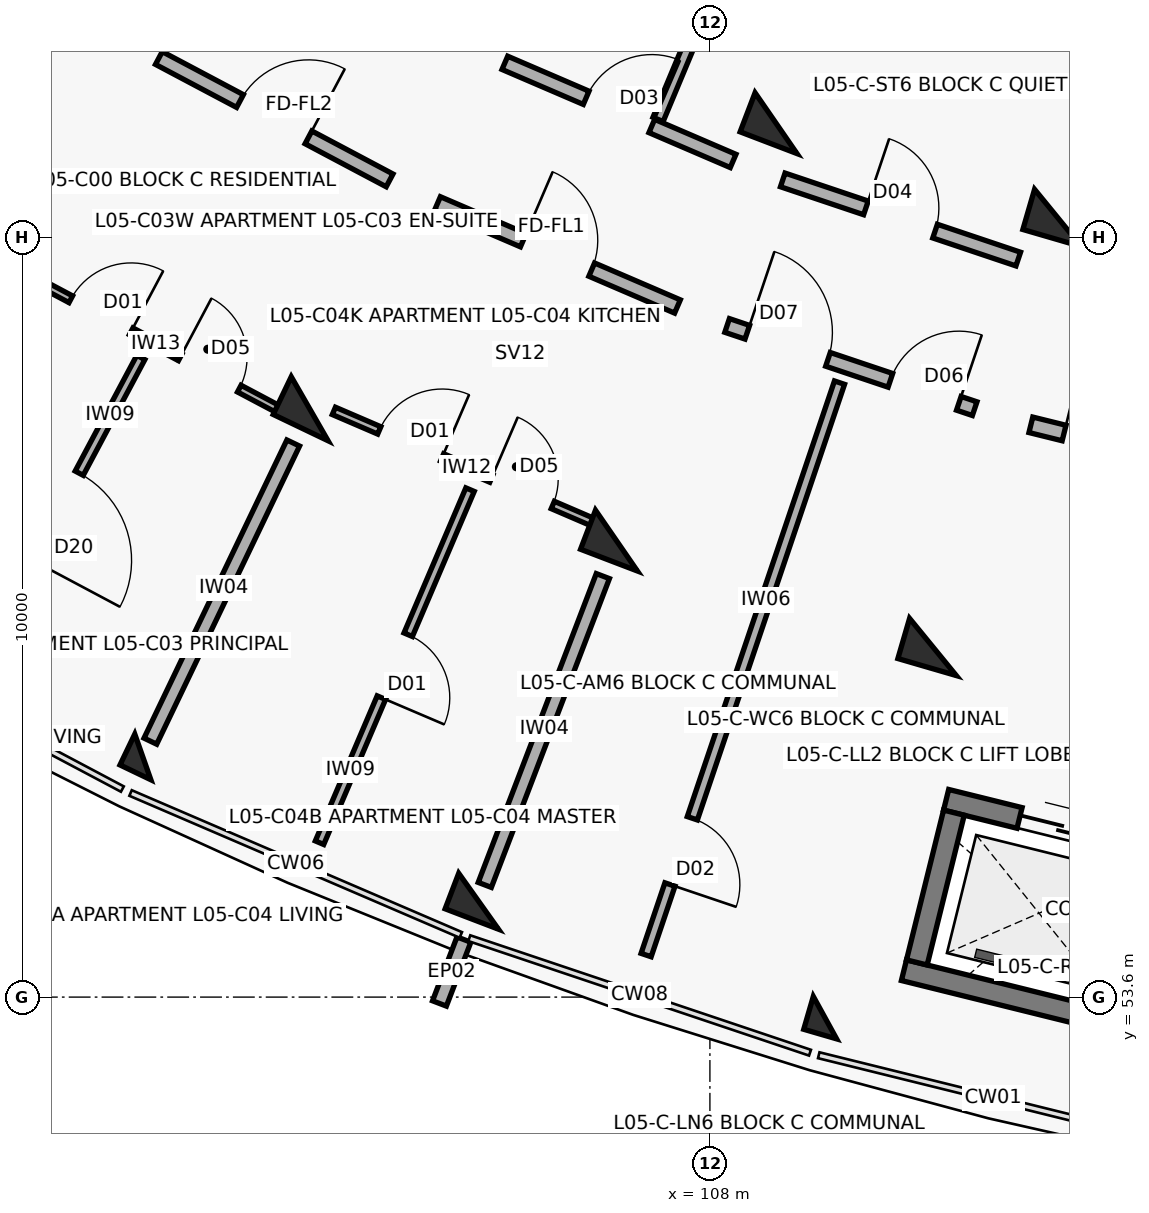
"""IFC4 building model, lengths in metres.
Left out: names, types, materials, properties, quantities, classifications, styles, units other than length and angle.
Written with IfcOpenShell. Run it as: python <this file> out.ifc"""

import sys

from ifc_helpers import new_model, si_unit, direction, frame, frame_2d, origin, origin_2d, place, context, subcontext, project, spatial, rectangle, extrude, element, fill, save


model = new_model("IFC4")
c1 = context("Model", 3, precision=1e-05, world=origin(), true_north=direction((0.0, 1.0)))
c2 = subcontext(c1, "Body", "Model", "MODEL_VIEW")
j1 = project(units=[si_unit("LENGTHUNIT", "METRE"), si_unit("PLANEANGLEUNIT", "RADIAN")], contexts=[c1])
p1 = place(None, origin())
s1 = spatial("IfcSite", under=j1, at=p1, CompositionType="ELEMENT")
p2 = place(p1, origin())
s2 = spatial("IfcBuilding", under=s1, at=p2, CompositionType="ELEMENT")
p3 = place(p2, frame((0.0, 0.0, 17.4)))
s3 = spatial("IfcBuildingStorey", under=s2, at=p3, CompositionType="ELEMENT", Elevation=17.4)
p4 = place(p3, frame((102.734, 61.341, 0.0), z_axis=(0.0, 0.0, 1.0), x_axis=(-0.432085748802, -0.901832526405, 0.0)))
e1 = element("IfcColumn", 1, at=p4, inside=s3, PredefinedType="COLUMN", context=c2, shape_type="SweptSolid", body=[
    extrude(rectangle(XDim=0.55, YDim=0.8, at=origin_2d()), origin(), (0.0, 0.0, 1.0), 3.1),
])
p5 = place(p3, frame((100.539, 56.76, 0.0), z_axis=(0.0, 0.0, 1.0), x_axis=(-0.432085748802, -0.901832526405, 0.0)))
e2 = element("IfcColumn", 2, at=p5, inside=s3, PredefinedType="COLUMN", context=c2, shape_type="SweptSolid", body=[
    extrude(rectangle(XDim=0.45, YDim=0.45, at=origin_2d()), origin(), (0.0, 0.0, 1.0), 3.1),
])
for number, where, z_axis, x_axis in (
    (3, (108.869, 65.099, 0.0), (0.0, 0.0, 1.0), (-0.357, -0.934, 0.0)),
    (4, (106.77, 59.606, 0.0), (0.0, 0.0, 1.0), (-0.357, -0.934, 0.0)),
):
    element("IfcColumn", number, at=place(p3, frame(where, z_axis=z_axis, x_axis=x_axis)), inside=s3, PredefinedType="COLUMN", context=c2, shape_type="SweptSolid", body=[
        extrude(rectangle(XDim=0.55, YDim=0.8, at=origin_2d()), origin(), (0.0, 0.0, 1.0), 3.1),
    ])
p6 = place(p3, frame((104.956, 54.861, 0.0), z_axis=(0.0, 0.0, 1.0), x_axis=(-0.357064076459, -0.934079892355, 0.0)))
e5 = element("IfcColumn", 5, at=p6, inside=s3, PredefinedType="COLUMN", context=c2, shape_type="SweptSolid", body=[
    extrude(rectangle(XDim=0.5, YDim=0.75, at=origin_2d()), origin(), (0.0, 0.0, 1.0), 3.1),
])
for number, where, z_axis, x_axis in (
    (6, (112.579, 63.852, 0.0), (0.0, 0.0, 1.0), (-0.28, -0.96, 0.0)),
    (7, (110.934, 58.207, 0.0), (0.0, 0.0, 1.0), (-0.28, -0.96, 0.0)),
):
    element("IfcColumn", number, at=place(p3, frame(where, z_axis=z_axis, x_axis=x_axis)), inside=s3, PredefinedType="COLUMN", context=c2, shape_type="SweptSolid", body=[
        extrude(rectangle(XDim=0.55, YDim=0.8, at=origin_2d()), origin(), (0.0, 0.0, 1.0), 3.1),
    ])
p7 = place(p3, frame((109.513, 53.329, 0.0), z_axis=(0.0, 0.0, 1.0), x_axis=(-0.27966144946, -0.96009867914, 0.0)))
e8 = element("IfcColumn", 8, at=p7, inside=s3, PredefinedType="COLUMN", context=c2, shape_type="SweptSolid", body=[
    extrude(rectangle(XDim=0.45, YDim=0.45, at=origin_2d()), origin(), (0.0, 0.0, 1.0), 3.1),
])
p8 = place(p3, frame((104.763, 54.357, 0.0), z_axis=(0.0, 0.0, 1.0), x_axis=(-0.357033038474, -0.934091756434, 0.0)))
e9 = element("IfcWall", 9, at=p8, inside=s3, PredefinedType="PARAPET", context=c2, shape_type="SweptSolid", body=[
    extrude(rectangle(XDim=0.9, YDim=0.195, at=frame_2d((0.45, 0.0))), origin(), (0.0, 0.0, 1.0), 2.25),
])
p9 = place(p3, frame((111.108, 56.196, 0.0), z_axis=(0.0, 0.0, 1.0), x_axis=(0.970706856107, -0.240266933861, 0.0)))
e10 = element("IfcWall", 10, at=p9, inside=s3, PredefinedType="SHEAR", context=c2, shape_type="SweptSolid", body=[
    extrude(rectangle(XDim=3.09, YDim=0.28, at=frame_2d((1.545, 0.0))), origin(), (0.0, 0.0, 1.0), 3.1),
])
p10 = place(p9, frame((0.995, 0.0, 0.0)))
e11 = element("IfcOpeningElement", 11, at=p10, cuts=e10, PredefinedType="OPENING", context=c2, shape_type="SweptSolid", body=[
    extrude(rectangle(XDim=1.1, YDim=2.15, at=frame_2d((0.55, 1.075))), frame((0.0, 0.15, 0.0), z_axis=(0.0, -1.0, 0.0), x_axis=(1.0, 0.0, 0.0)), (0.0, 0.0, 1.0), 0.3),
])
p11 = place(p3, frame((110.553, 53.954, 0.0), z_axis=(0.0, 0.0, 1.0), x_axis=(0.970725280816, -0.240192483614, 0.0)))
e12 = element("IfcWall", 12, at=p11, inside=s3, PredefinedType="SHEAR", context=c2, shape_type="SweptSolid", body=[
    extrude(rectangle(XDim=3.09, YDim=0.28, at=frame_2d((1.545, 0.0))), origin(), (0.0, 0.0, 1.0), 3.1),
])
p12 = place(p3, frame((111.21, 56.027, 0.0), z_axis=(0.0, 0.0, 1.0), x_axis=(-0.240186044774, -0.970726873995, 0.0)))
e13 = element("IfcWall", 13, at=p12, inside=s3, PredefinedType="SHEAR", context=c2, shape_type="SweptSolid", body=[
    extrude(rectangle(XDim=2.03, YDim=0.28, at=frame_2d((1.015, 0.0))), origin(), (0.0, 0.0, 1.0), 3.1),
])
p13 = place(p3, frame((100.75, 65.956, 0.0), z_axis=(0.0, 0.0, 1.0), x_axis=(0.883440266101, -0.468543803963, 0.0)))
e14 = element("IfcWall", 14, at=p13, inside=s3, PredefinedType="SOLIDWALL", context=c2, shape_type="SweptSolid", body=[
    extrude(rectangle(XDim=3.436, YDim=0.19, at=frame_2d((1.718, 0.0))), origin(), (0.0, 0.0, 1.0), 2.08),
])
p14 = place(p13, frame((1.208, 0.0, 0.0)))
e15 = element("IfcOpeningElement", 15, at=p14, cuts=e14, PredefinedType="OPENING", context=c2, shape_type="SweptSolid", body=[
    extrude(rectangle(XDim=1.02, YDim=2.15, at=frame_2d((0.51, 1.075))), frame((0.0, 0.105, 0.0), z_axis=(0.0, -1.0, 0.0), x_axis=(1.0, 0.0, 0.0)), (0.0, 0.0, 1.0), 0.21),
])
p15 = place(p3, frame((99.017, 63.087, 0.0), z_axis=(0.0, 0.0, 1.0), x_axis=(0.883415075746, -0.468591297342, 0.0)))
e16 = element("IfcWall", 16, at=p15, inside=s3, PredefinedType="PARTITIONING", context=c2, shape_type="SweptSolid", body=[
    extrude(rectangle(XDim=3.81, YDim=0.1, at=frame_2d((1.905, 0.0))), origin(), (0.0, 0.0, 1.0), 2.08),
])
p16 = place(p15, frame((0.65, 0.0, 0.0)))
e17 = element("IfcOpeningElement", 17, at=p16, cuts=e16, PredefinedType="OPENING", context=c2, shape_type="SweptSolid", body=[
    extrude(rectangle(XDim=0.9, YDim=2.1, at=frame_2d((0.45, 1.05))), frame((0.0, 0.06, 0.0), z_axis=(0.0, -1.0, 0.0), x_axis=(1.0, 0.0, 0.0)), (0.0, 0.0, 1.0), 0.12),
])
p17 = place(p15, frame((2.28, 0.0, 0.0)))
e18 = element("IfcOpeningElement", 18, at=p17, cuts=e16, PredefinedType="OPENING", context=c2, shape_type="SweptSolid", body=[
    extrude(rectangle(XDim=0.88, YDim=2.1, at=frame_2d((0.44, 1.05))), frame((0.0, 0.06, 0.0), z_axis=(0.0, -1.0, 0.0), x_axis=(1.0, 0.0, 0.0)), (0.0, 0.0, 1.0), 0.12),
])
p18 = place(p3, frame((100.513, 62.016, 0.0), z_axis=(0.0, 0.0, 1.0), x_axis=(-0.469889133168, -0.882725440061, 0.0)))
e19 = element("IfcWall", 19, at=p18, inside=s3, PredefinedType="PARTITIONING", context=c2, shape_type="SweptSolid", body=[
    extrude(rectangle(XDim=4.75, YDim=0.12, at=frame_2d((2.375, 0.0))), origin(), (0.0, 0.0, 1.0), 2.08),
])
p19 = place(p18, frame((1.725, 0.0, 0.0)))
e20 = element("IfcOpeningElement", 20, at=p19, cuts=e19, PredefinedType="OPENING", context=c2, shape_type="SweptSolid", body=[
    extrude(rectangle(XDim=1.3, YDim=2.1, at=frame_2d((0.65, 1.05))), frame((0.0, 0.07, 0.0), z_axis=(0.0, -1.0, 0.0), x_axis=(1.0, 0.0, 0.0)), (0.0, 0.0, 1.0), 0.14),
])
p20 = place(p3, frame((104.417, 64.044, 0.0), z_axis=(0.0, 0.0, 1.0), x_axis=(0.918718172399, -0.394913813008, 0.0)))
e21 = element("IfcWall", 21, at=p20, inside=s3, PredefinedType="SOLIDWALL", context=c2, shape_type="SweptSolid", body=[
    extrude(rectangle(XDim=3.436, YDim=0.19, at=frame_2d((1.718, 0.0))), origin(), (0.0, 0.0, 1.0), 2.08),
])
p21 = place(p20, frame((1.228, 0.0, 0.0)))
e22 = element("IfcOpeningElement", 22, at=p21, cuts=e21, PredefinedType="OPENING", context=c2, shape_type="SweptSolid", body=[
    extrude(rectangle(XDim=0.98, YDim=2.15, at=frame_2d((0.49, 1.075))), frame((0.0, 0.105, 0.0), z_axis=(0.0, -1.0, 0.0), x_axis=(1.0, 0.0, 0.0)), (0.0, 0.0, 1.0), 0.21),
])
p22 = place(p3, frame((105.302, 65.893, 0.0), z_axis=(0.0, 0.0, 1.0), x_axis=(0.918723391052, -0.394901672235, 0.0)))
e23 = element("IfcWall", 23, at=p22, inside=s3, PredefinedType="SOLIDWALL", context=c2, shape_type="SweptSolid", body=[
    extrude(rectangle(XDim=3.269, YDim=0.19, at=frame_2d((1.634, 0.0))), origin(), (0.0, 0.0, 1.0), 2.08),
])
p23 = place(p22, frame((1.164, 0.0, 0.0)))
e24 = element("IfcOpeningElement", 24, at=p23, cuts=e23, PredefinedType="OPENING", context=c2, shape_type="SweptSolid", body=[
    extrude(rectangle(XDim=0.94, YDim=2.1, at=frame_2d((0.47, 1.05))), frame((0.0, 0.105, 0.0), z_axis=(0.0, -1.0, 0.0), x_axis=(1.0, 0.0, 0.0)), (0.0, 0.0, 1.0), 0.21),
])
p24 = place(p3, frame((108.589, 68.194, 0.0), z_axis=(0.0, 0.0, 1.0), x_axis=(-0.385151143297, -0.922853507777, 0.0)))
e25 = element("IfcWall", 25, at=p24, inside=s3, PredefinedType="PARTITIONING", context=c2, shape_type="SweptSolid", body=[
    extrude(rectangle(XDim=3.3, YDim=0.145, at=frame_2d((1.65, 0.0))), origin(), (0.0, 0.0, 1.0), 2.08),
])
p25 = place(p24, frame((1.21, 0.0, 0.0)))
e26 = element("IfcOpeningElement", 26, at=p25, cuts=e25, PredefinedType="OPENING", context=c2, shape_type="SweptSolid", body=[
    extrude(rectangle(XDim=0.88, YDim=2.1, at=frame_2d((0.44, 1.05))), frame((0.0, 0.083, 0.0), z_axis=(0.0, -1.0, 0.0), x_axis=(1.0, 0.0, 0.0)), (0.0, 0.0, 1.0), 0.165),
])
p26 = place(p3, frame((103.052, 61.313, 0.0), z_axis=(0.0, 0.0, 1.0), x_axis=(0.918714121981, -0.39492323567, 0.0)))
e27 = element("IfcWall", 27, at=p26, inside=s3, PredefinedType="PARTITIONING", context=c2, shape_type="SweptSolid", body=[
    extrude(rectangle(XDim=3.785, YDim=0.105, at=frame_2d((1.893, 0.0))), origin(), (0.0, 0.0, 1.0), 2.08),
])
p27 = place(p26, frame((0.65, 0.0, 0.0)))
e28 = element("IfcOpeningElement", 28, at=p27, cuts=e27, PredefinedType="OPENING", context=c2, shape_type="SweptSolid", body=[
    extrude(rectangle(XDim=0.9, YDim=2.1, at=frame_2d((0.45, 1.05))), frame((0.0, 0.062, 0.0), z_axis=(0.0, -1.0, 0.0), x_axis=(1.0, 0.0, 0.0)), (0.0, 0.0, 1.0), 0.125),
])
p28 = place(p26, frame((2.255, 0.0, 0.0)))
e29 = element("IfcOpeningElement", 29, at=p28, cuts=e27, PredefinedType="OPENING", context=c2, shape_type="SweptSolid", body=[
    extrude(rectangle(XDim=0.88, YDim=2.1, at=frame_2d((0.44, 1.05))), frame((0.0, 0.062, 0.0), z_axis=(0.0, -1.0, 0.0), x_axis=(1.0, 0.0, 0.0)), (0.0, 0.0, 1.0), 0.125),
])
p29 = place(p3, frame((104.844, 60.277, 0.0), z_axis=(0.0, 0.0, 1.0), x_axis=(-0.392127280422, -0.919910971751, 0.0)))
e30 = element("IfcWall", 30, at=p29, inside=s3, PredefinedType="PARTITIONING", context=c2, shape_type="SweptSolid", body=[
    extrude(rectangle(XDim=5.05, YDim=0.12, at=frame_2d((2.525, 0.0))), origin(), (0.0, 0.0, 1.0), 2.08),
])
p30 = place(p29, frame((2.075, 0.0, 0.0)))
e31 = element("IfcOpeningElement", 31, at=p30, cuts=e30, PredefinedType="OPENING", context=c2, shape_type="SweptSolid", body=[
    extrude(rectangle(XDim=0.9, YDim=2.1, at=frame_2d((0.45, 1.05))), frame((0.0, 0.07, 0.0), z_axis=(0.0, -1.0, 0.0), x_axis=(1.0, 0.0, 0.0)), (0.0, 0.0, 1.0), 0.14),
])
p31 = place(p3, frame((102.518, 60.89, 0.0), z_axis=(0.0, 0.0, 1.0), x_axis=(-0.432108769108, -0.901821496561, 0.0)))
e32 = element("IfcWall", 32, at=p31, inside=s3, PredefinedType="SOLIDWALL", context=c2, shape_type="SweptSolid", body=[
    extrude(rectangle(XDim=4.35, YDim=0.185, at=frame_2d((2.175, 0.0))), origin(), (0.0, 0.0, 1.0), 2.08),
])
p32 = place(p3, frame((108.227, 62.437, 0.0), z_axis=(0.0, 0.0, 1.0), x_axis=(0.947884468821, -0.318614239745, 0.0)))
e33 = element("IfcWall", 33, at=p32, inside=s3, PredefinedType="SOLIDWALL", context=c2, shape_type="SweptSolid", body=[
    extrude(rectangle(XDim=3.436, YDim=0.19, at=frame_2d((1.718, 0.0))), origin(), (0.0, 0.0, 1.0), 2.08),
])
p33 = place(p32, frame((0.28, 0.0, 0.0)))
e34 = element("IfcOpeningElement", 34, at=p33, cuts=e33, PredefinedType="OPENING", context=c2, shape_type="SweptSolid", body=[
    extrude(rectangle(XDim=1.12, YDim=2.15, at=frame_2d((0.56, 1.075))), frame((0.0, 0.105, 0.0), z_axis=(0.0, -1.0, 0.0), x_axis=(1.0, 0.0, 0.0)), (0.0, 0.0, 1.0), 0.21),
])
p34 = place(p32, frame((2.266, 0.0, 0.0)))
e35 = element("IfcOpeningElement", 35, at=p34, cuts=e33, PredefinedType="OPENING", context=c2, shape_type="SweptSolid", body=[
    extrude(rectangle(XDim=0.95, YDim=2.1, at=frame_2d((0.475, 1.05))), frame((0.0, 0.105, 0.0), z_axis=(0.0, -1.0, 0.0), x_axis=(1.0, 0.0, 0.0)), (0.0, 0.0, 1.0), 0.21),
])
p35 = place(p3, frame((108.958, 64.352, 0.0), z_axis=(0.0, 0.0, 1.0), x_axis=(0.94787351033, -0.318646839643, 0.0)))
e36 = element("IfcWall", 36, at=p35, inside=s3, PredefinedType="SOLIDWALL", context=c2, shape_type="SweptSolid", body=[
    extrude(rectangle(XDim=3.269, YDim=0.19, at=frame_2d((1.634, 0.0))), origin(), (0.0, 0.0, 1.0), 2.08),
])
p36 = place(p35, frame((1.154, 0.0, 0.0)))
e37 = element("IfcOpeningElement", 37, at=p36, cuts=e36, PredefinedType="OPENING", context=c2, shape_type="SweptSolid", body=[
    extrude(rectangle(XDim=0.96, YDim=2.1, at=frame_2d((0.48, 1.05))), frame((0.0, 0.105, 0.0), z_axis=(0.0, -1.0, 0.0), x_axis=(1.0, 0.0, 0.0)), (0.0, 0.0, 1.0), 0.21),
])
p37 = place(p3, frame((109.705, 61.685, 0.0), z_axis=(0.0, 0.0, 1.0), x_axis=(-0.320057771325, -0.947398027766, 0.0)))
e38 = element("IfcWall", 38, at=p37, inside=s3, PredefinedType="PARTITIONING", context=c2, shape_type="SweptSolid", body=[
    extrude(rectangle(XDim=7.95, YDim=0.14, at=frame_2d((3.975, 0.0))), origin(), (0.0, 0.0, 1.0), 2.08),
])
p38 = place(p37, frame((6.05, 0.0, 0.0)))
e39 = element("IfcOpeningElement", 39, at=p38, cuts=e38, PredefinedType="OPENING", context=c2, shape_type="SweptSolid", body=[
    extrude(rectangle(XDim=0.92, YDim=2.1, at=frame_2d((0.46, 1.05))), frame((0.0, 0.08, 0.0), z_axis=(0.0, -1.0, 0.0), x_axis=(1.0, 0.0, 0.0)), (0.0, 0.0, 1.0), 0.16),
])
p39 = place(p3, frame((106.591, 59.139, 0.0), z_axis=(0.0, 0.0, 1.0), x_axis=(-0.357064016205, -0.934079915388, 0.0)))
e40 = element("IfcWall", 40, at=p39, inside=s3, PredefinedType="SOLIDWALL", context=c2, shape_type="SweptSolid", body=[
    extrude(rectangle(XDim=4.35, YDim=0.185, at=frame_2d((2.175, 0.0))), origin(), (0.0, 0.0, 1.0), 2.08),
])
p40 = place(p3, frame((112.223, 61.13, 0.0), z_axis=(0.0, 0.0, 1.0), x_axis=(0.970719238682, -0.240216901263, 0.0)))
e41 = element("IfcWall", 41, at=p40, inside=s3, PredefinedType="SOLIDWALL", context=c2, shape_type="SweptSolid", body=[
    extrude(rectangle(XDim=3.296, YDim=0.21, at=frame_2d((1.648, 0.0))), origin(), (0.0, 0.0, 1.0), 2.08),
])
p41 = place(p40, frame((0.45, 0.0, 0.0)))
e42 = element("IfcOpeningElement", 42, at=p41, cuts=e41, PredefinedType="OPENING", context=c2, shape_type="SweptSolid", body=[
    extrude(rectangle(XDim=1.1, YDim=2.15, at=frame_2d((0.55, 1.075))), frame((0.0, 0.115, 0.0), z_axis=(0.0, -1.0, 0.0), x_axis=(1.0, 0.0, 0.0)), (0.0, 0.0, 1.0), 0.23),
])
p42 = place(p40, frame((1.726, 0.0, 0.0)))
e43 = element("IfcOpeningElement", 43, at=p42, cuts=e41, PredefinedType="OPENING", context=c2, shape_type="SweptSolid", body=[
    extrude(rectangle(XDim=1.12, YDim=2.15, at=frame_2d((0.56, 1.075))), frame((0.0, 0.115, 0.0), z_axis=(0.0, -1.0, 0.0), x_axis=(1.0, 0.0, 0.0)), (0.0, 0.0, 1.0), 0.23),
])
p43 = place(p10, origin())
e44 = element("IfcDoor", 44, at=p43, inside=s3, OperationType="DOUBLE_DOOR_SLIDING", PredefinedType="DOOR", context=c2, shape_type="SweptSolid", body=[
    extrude(rectangle(XDim=1.1, YDim=2.15, at=frame_2d((0.55, 1.075))), frame((0.0, 0.025, 0.0), z_axis=(0.0, -1.0, 0.0), x_axis=(1.0, 0.0, 0.0)), (0.0, 0.0, 1.0), 0.05),
])
fill(e11, e44)
p44 = place(p14, origin())
e45 = element("IfcDoor", 45, at=p44, inside=s3, OperationType="SINGLE_SWING_RIGHT", PredefinedType="DOOR", context=c2, shape_type="SweptSolid", body=[
    extrude(rectangle(XDim=1.02, YDim=2.15, at=frame_2d((0.51, 1.075))), frame((0.0, 0.025, 0.0), z_axis=(0.0, -1.0, 0.0), x_axis=(1.0, 0.0, 0.0)), (0.0, 0.0, 1.0), 0.05),
])
fill(e15, e45)
p45 = place(p16, origin())
e46 = element("IfcDoor", 46, at=p45, inside=s3, OperationType="SINGLE_SWING_RIGHT", PredefinedType="DOOR", context=c2, shape_type="SweptSolid", body=[
    extrude(rectangle(XDim=0.9, YDim=2.1, at=frame_2d((0.45, 1.05))), frame((0.0, 0.025, 0.0), z_axis=(0.0, -1.0, 0.0), x_axis=(1.0, 0.0, 0.0)), (0.0, 0.0, 1.0), 0.05),
])
fill(e17, e46)
p46 = place(p17, origin())
e47 = element("IfcDoor", 47, at=p46, inside=s3, OperationType="SINGLE_SWING_LEFT", PredefinedType="DOOR", context=c2, shape_type="SweptSolid", body=[
    extrude(rectangle(XDim=0.88, YDim=2.1, at=frame_2d((0.44, 1.05))), frame((0.0, 0.025, 0.0), z_axis=(0.0, -1.0, 0.0), x_axis=(1.0, 0.0, 0.0)), (0.0, 0.0, 1.0), 0.05),
])
fill(e18, e47)
p47 = place(p19, origin())
e48 = element("IfcDoor", 48, at=p47, inside=s3, OperationType="SINGLE_SWING_RIGHT", PredefinedType="DOOR", context=c2, shape_type="SweptSolid", body=[
    extrude(rectangle(XDim=1.3, YDim=2.1, at=frame_2d((0.65, 1.05))), frame((0.0, 0.025, 0.0), z_axis=(0.0, -1.0, 0.0), x_axis=(1.0, 0.0, 0.0)), (0.0, 0.0, 1.0), 0.05),
])
fill(e20, e48)
p48 = place(p21, origin())
e49 = element("IfcDoor", 49, at=p48, inside=s3, OperationType="SINGLE_SWING_LEFT", PredefinedType="DOOR", context=c2, shape_type="SweptSolid", body=[
    extrude(rectangle(XDim=0.98, YDim=2.15, at=frame_2d((0.49, 1.075))), frame((0.0, 0.025, 0.0), z_axis=(0.0, -1.0, 0.0), x_axis=(1.0, 0.0, 0.0)), (0.0, 0.0, 1.0), 0.05),
])
fill(e22, e49)
p49 = place(p23, origin())
e50 = element("IfcDoor", 50, at=p49, inside=s3, OperationType="SINGLE_SWING_RIGHT", PredefinedType="DOOR", context=c2, shape_type="SweptSolid", body=[
    extrude(rectangle(XDim=0.94, YDim=2.1, at=frame_2d((0.47, 1.05))), frame((0.0, 0.025, 0.0), z_axis=(0.0, -1.0, 0.0), x_axis=(1.0, 0.0, 0.0)), (0.0, 0.0, 1.0), 0.05),
])
fill(e24, e50)
p50 = place(p27, origin())
e51 = element("IfcDoor", 51, at=p50, inside=s3, OperationType="SINGLE_SWING_RIGHT", PredefinedType="DOOR", context=c2, shape_type="SweptSolid", body=[
    extrude(rectangle(XDim=0.9, YDim=2.1, at=frame_2d((0.45, 1.05))), frame((0.0, 0.025, 0.0), z_axis=(0.0, -1.0, 0.0), x_axis=(1.0, 0.0, 0.0)), (0.0, 0.0, 1.0), 0.05),
])
fill(e28, e51)
p51 = place(p28, origin())
e52 = element("IfcDoor", 52, at=p51, inside=s3, OperationType="SINGLE_SWING_LEFT", PredefinedType="DOOR", context=c2, shape_type="SweptSolid", body=[
    extrude(rectangle(XDim=0.88, YDim=2.1, at=frame_2d((0.44, 1.05))), frame((0.0, 0.025, 0.0), z_axis=(0.0, -1.0, 0.0), x_axis=(1.0, 0.0, 0.0)), (0.0, 0.0, 1.0), 0.05),
])
fill(e29, e52)
p52 = place(p30, origin())
e53 = element("IfcDoor", 53, at=p52, inside=s3, OperationType="SINGLE_SWING_RIGHT", PredefinedType="DOOR", context=c2, shape_type="SweptSolid", body=[
    extrude(rectangle(XDim=0.9, YDim=2.1, at=frame_2d((0.45, 1.05))), frame((0.0, 0.025, 0.0), z_axis=(0.0, -1.0, 0.0), x_axis=(1.0, 0.0, 0.0)), (0.0, 0.0, 1.0), 0.05),
])
fill(e31, e53)
p53 = place(p33, origin())
e54 = element("IfcDoor", 54, at=p53, inside=s3, OperationType="SINGLE_SWING_LEFT", PredefinedType="DOOR", context=c2, shape_type="SweptSolid", body=[
    extrude(rectangle(XDim=1.12, YDim=2.15, at=frame_2d((0.56, 1.075))), frame((0.0, 0.025, 0.0), z_axis=(0.0, -1.0, 0.0), x_axis=(1.0, 0.0, 0.0)), (0.0, 0.0, 1.0), 0.05),
])
fill(e34, e54)
p54 = place(p34, origin())
e55 = element("IfcDoor", 55, at=p54, inside=s3, OperationType="SINGLE_SWING_RIGHT", PredefinedType="DOOR", context=c2, shape_type="SweptSolid", body=[
    extrude(rectangle(XDim=0.95, YDim=2.1, at=frame_2d((0.475, 1.05))), frame((0.0, 0.025, 0.0), z_axis=(0.0, -1.0, 0.0), x_axis=(1.0, 0.0, 0.0)), (0.0, 0.0, 1.0), 0.05),
])
fill(e35, e55)
p55 = place(p36, origin())
e56 = element("IfcDoor", 56, at=p55, inside=s3, OperationType="SINGLE_SWING_LEFT", PredefinedType="DOOR", context=c2, shape_type="SweptSolid", body=[
    extrude(rectangle(XDim=0.96, YDim=2.1, at=frame_2d((0.48, 1.05))), frame((0.0, 0.025, 0.0), z_axis=(0.0, -1.0, 0.0), x_axis=(1.0, 0.0, 0.0)), (0.0, 0.0, 1.0), 0.05),
])
fill(e37, e56)
p56 = place(p38, origin())
e57 = element("IfcDoor", 57, at=p56, inside=s3, OperationType="SINGLE_SWING_RIGHT", PredefinedType="DOOR", context=c2, shape_type="SweptSolid", body=[
    extrude(rectangle(XDim=0.92, YDim=2.1, at=frame_2d((0.46, 1.05))), frame((0.0, 0.025, 0.0), z_axis=(0.0, -1.0, 0.0), x_axis=(1.0, 0.0, 0.0)), (0.0, 0.0, 1.0), 0.05),
])
fill(e39, e57)
p57 = place(p41, origin())
e58 = element("IfcDoor", 58, at=p57, inside=s3, OperationType="SINGLE_SWING_LEFT", PredefinedType="DOOR", context=c2, shape_type="SweptSolid", body=[
    extrude(rectangle(XDim=1.1, YDim=2.15, at=frame_2d((0.55, 1.075))), frame((0.0, 0.025, 0.0), z_axis=(0.0, -1.0, 0.0), x_axis=(1.0, 0.0, 0.0)), (0.0, 0.0, 1.0), 0.05),
])
fill(e42, e58)
save(model, sys.argv[1])
